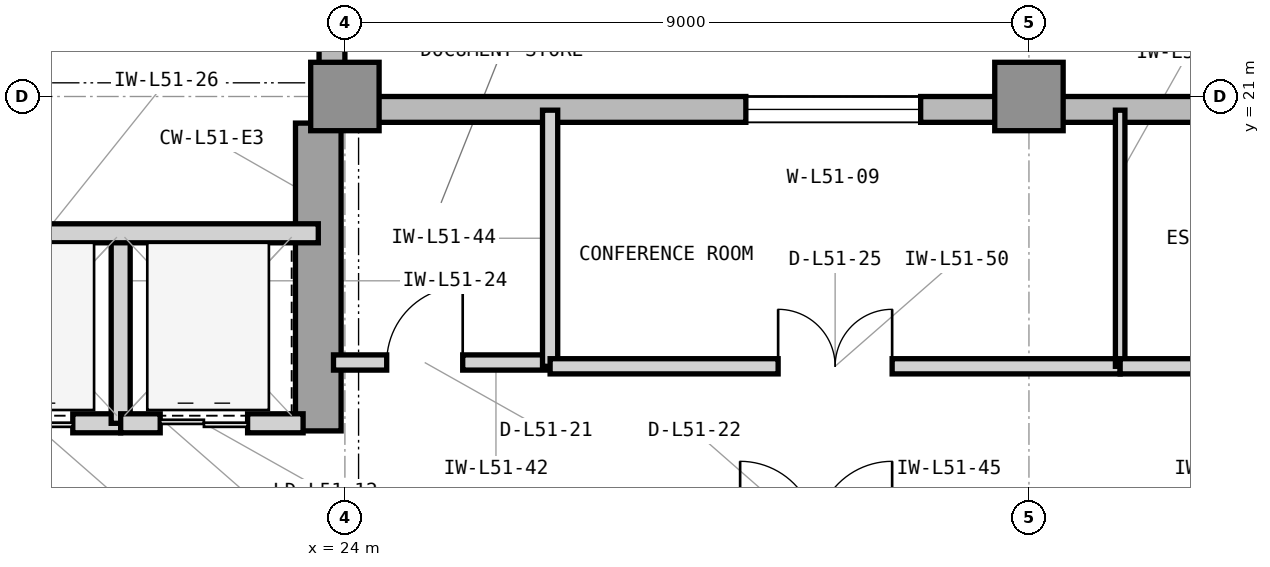
"""IFC4 building model, lengths in metres.
Left out: names, types, materials, properties, quantities, classifications, styles, units other than length and angle.
Written with IfcOpenShell. Run it as: python <this file> out.ifc"""

import sys

from ifc_helpers import new_model, si_unit, direction, frame, frame_2d, origin, origin_2d, place, context, subcontext, project, spatial, rectangle, extrude, element, fill, save


model = new_model("IFC4")
c1 = context("Model", 3, precision=1e-05, world=origin(), true_north=direction((0.0, 1.0)))
c2 = subcontext(c1, "Body", "Model", "MODEL_VIEW")
j1 = project(units=[si_unit("LENGTHUNIT", "METRE"), si_unit("PLANEANGLEUNIT", "RADIAN")], contexts=[c1])
p1 = place(None, origin())
s1 = spatial("IfcSite", under=j1, at=p1, CompositionType="ELEMENT")
p2 = place(p1, origin())
s2 = spatial("IfcBuilding", under=s1, at=p2, CompositionType="ELEMENT")
p3 = place(p2, frame((0.0, 0.0, 211.2)))
s3 = spatial("IfcBuildingStorey", under=s2, at=p3, CompositionType="ELEMENT", Elevation=211.2)
p4 = place(p3, frame((23.65, 16.6, 0.0), z_axis=(0.0, 0.0, 1.0), x_axis=(0.0, 1.0, 0.0)))
e1 = element("IfcWall", 1, at=p4, inside=s3, PredefinedType="SHEAR", context=c2, shape_type="SweptSolid", body=[
    extrude(rectangle(XDim=4.05, YDim=0.6, at=frame_2d((2.025, 0.0))), origin(), (0.0, 0.0, 1.0), 3.9),
])
for number, where, z_axis, x_axis in (
    (2, (24.0, 21.0, 0.0), (0.0, 0.0, 1.0), (1.0, 0.0, 0.0)),
    (3, (33.0, 21.0, 0.0), (0.0, 0.0, 1.0), (1.0, 0.0, 0.0)),
):
    element("IfcColumn", number, at=place(p3, frame(where, z_axis=z_axis, x_axis=x_axis)), inside=s3, PredefinedType="COLUMN", context=c2, shape_type="SweptSolid", body=[
        extrude(rectangle(XDim=0.9, YDim=0.9, at=origin_2d()), origin(), (0.0, 0.0, 1.0), 3.9),
    ])
p5 = place(p3, frame((55.4, 20.83, 0.0), z_axis=(0.0, 0.0, 1.0), x_axis=(-1.0, 0.0, 0.0)))
e4 = element("IfcWall", 4, at=p5, inside=s3, PredefinedType="STANDARD", context=c2, shape_type="SweptSolid", body=[
    extrude(rectangle(XDim=31.4, YDim=0.34, at=frame_2d((15.7, 0.0))), origin(), (0.0, 0.0, 1.0), 3.7),
])
p6 = place(p5, frame((17.167, 0.0, 0.9)))
e5 = element("IfcOpeningElement", 5, at=p6, cuts=e4, PredefinedType="OPENING", context=c2, shape_type="SweptSolid", body=[
    extrude(rectangle(XDim=2.3, YDim=2.2, at=frame_2d((1.15, 1.1))), frame((0.0, 0.18, 0.0), z_axis=(0.0, -1.0, 0.0), x_axis=(1.0, 0.0, 0.0)), (0.0, 0.0, 1.0), 0.36),
])
p7 = place(p5, frame((23.825, 0.0, 0.9)))
e6 = element("IfcOpeningElement", 6, at=p7, cuts=e4, PredefinedType="OPENING", context=c2, shape_type="SweptSolid", body=[
    extrude(rectangle(XDim=2.3, YDim=2.2, at=frame_2d((1.15, 1.1))), frame((0.0, 0.18, 0.0), z_axis=(0.0, -1.0, 0.0), x_axis=(1.0, 0.0, 0.0)), (0.0, 0.0, 1.0), 0.36),
])
p8 = place(p5, frame((8.375, 0.0, 0.9)))
e7 = element("IfcOpeningElement", 7, at=p8, cuts=e4, PredefinedType="OPENING", context=c2, shape_type="SweptSolid", body=[
    extrude(rectangle(XDim=2.3, YDim=2.2, at=frame_2d((1.15, 1.1))), frame((0.0, 0.18, 0.0), z_axis=(0.0, -1.0, 0.0), x_axis=(1.0, 0.0, 0.0)), (0.0, 0.0, 1.0), 0.36),
])
p9 = place(p3, frame((23.83, 21.0, 0.0), z_axis=(0.0, 0.0, 1.0), x_axis=(0.0, 1.0, 0.0)))
e8 = element("IfcWall", 8, at=p9, inside=s3, PredefinedType="STANDARD", context=c2, shape_type="SweptSolid", body=[
    extrude(rectangle(XDim=19.4, YDim=0.34, at=frame_2d((9.7, 0.0))), origin(), (0.0, 0.0, 1.0), 3.7),
])
p10 = place(p3, frame((18.75, 16.7, 0.0), z_axis=(0.0, 0.0, 1.0), x_axis=(1.0, 0.0, 0.0)))
e9 = element("IfcWall", 9, at=p10, inside=s3, PredefinedType="PARTITIONING", context=c2, shape_type="SweptSolid", body=[
    extrude(rectangle(XDim=2.3, YDim=0.25, at=frame_2d((1.15, 0.0))), origin(), (0.0, 0.0, 1.0), 3.283),
])
p11 = place(p10, frame((0.52, 0.0, 0.0)))
e10 = element("IfcOpeningElement", 10, at=p11, cuts=e9, PredefinedType="OPENING", context=c2, shape_type="SweptSolid", body=[
    extrude(rectangle(XDim=1.15, YDim=2.25, at=frame_2d((0.575, 1.125))), frame((0.0, 0.135, 0.0), z_axis=(0.0, -1.0, 0.0), x_axis=(1.0, 0.0, 0.0)), (0.0, 0.0, 1.0), 0.27),
])
p12 = place(p3, frame((21.05, 16.7, 0.0), z_axis=(0.0, 0.0, 1.0), x_axis=(0.0, 1.0, 0.0)))
e11 = element("IfcWall", 11, at=p12, inside=s3, PredefinedType="PARTITIONING", context=c2, shape_type="SweptSolid", body=[
    extrude(rectangle(XDim=2.5, YDim=0.25, at=frame_2d((1.25, 0.0))), origin(), (0.0, 0.0, 1.0), 3.69),
])
p13 = place(p3, frame((21.05, 16.7, 0.0), z_axis=(0.0, 0.0, 1.0), x_axis=(1.0, 0.0, 0.0)))
e12 = element("IfcWall", 12, at=p13, inside=s3, PredefinedType="PARTITIONING", context=c2, shape_type="SweptSolid", body=[
    extrude(rectangle(XDim=2.4, YDim=0.25, at=frame_2d((1.2, 0.0))), origin(), (0.0, 0.0, 1.0), 3.283),
])
p14 = place(p13, frame((0.52, 0.0, 0.0)))
e13 = element("IfcOpeningElement", 13, at=p14, cuts=e12, PredefinedType="OPENING", context=c2, shape_type="SweptSolid", body=[
    extrude(rectangle(XDim=1.15, YDim=2.25, at=frame_2d((0.575, 1.125))), frame((0.0, 0.135, 0.0), z_axis=(0.0, -1.0, 0.0), x_axis=(1.0, 0.0, 0.0)), (0.0, 0.0, 1.0), 0.27),
])
p15 = place(p3, frame((16.45, 19.2, 0.0), z_axis=(0.0, 0.0, 1.0), x_axis=(1.0, 0.0, 0.0)))
e14 = element("IfcWall", 14, at=p15, inside=s3, PredefinedType="PARTITIONING", context=c2, shape_type="SweptSolid", body=[
    extrude(rectangle(XDim=7.2, YDim=0.25, at=frame_2d((3.6, 0.0))), origin(), (0.0, 0.0, 1.0), 3.69),
])
p16 = place(p3, frame((23.85, 17.5, 0.0), z_axis=(0.0, 0.0, 1.0), x_axis=(1.0, 0.0, 0.0)))
e15 = element("IfcWall", 15, at=p16, inside=s3, PredefinedType="PARTITIONING", context=c2, shape_type="SweptSolid", body=[
    extrude(rectangle(XDim=2.85, YDim=0.2, at=frame_2d((1.425, 0.0))), origin(), (0.0, 0.0, 1.0), 3.69),
])
p17 = place(p16, frame((0.7, 0.0, 0.0)))
e16 = element("IfcOpeningElement", 16, at=p17, cuts=e15, PredefinedType="OPENING", context=c2, shape_type="SweptSolid", body=[
    extrude(rectangle(XDim=1.0, YDim=2.15, at=frame_2d((0.5, 1.075))), frame((0.0, 0.11, 0.0), z_axis=(0.0, -1.0, 0.0), x_axis=(1.0, 0.0, 0.0)), (0.0, 0.0, 1.0), 0.22),
])
p18 = place(p3, frame((26.7, 17.45, 0.0), z_axis=(0.0, 0.0, 1.0), x_axis=(0.0, 1.0, 0.0)))
e17 = element("IfcWall", 17, at=p18, inside=s3, PredefinedType="PARTITIONING", context=c2, shape_type="SweptSolid", body=[
    extrude(rectangle(XDim=3.37, YDim=0.2, at=frame_2d((1.685, 0.0))), origin(), (0.0, 0.0, 1.0), 3.69),
])
p19 = place(p3, frame((26.7, 17.45, 0.0), z_axis=(0.0, 0.0, 1.0), x_axis=(1.0, 0.0, 0.0)))
e18 = element("IfcWall", 18, at=p19, inside=s3, PredefinedType="PARTITIONING", context=c2, shape_type="SweptSolid", body=[
    extrude(rectangle(XDim=7.5, YDim=0.2, at=frame_2d((3.75, 0.0))), origin(), (0.0, 0.0, 1.0), 3.69),
])
p20 = place(p19, frame((3.0, 0.0, 0.0)))
e19 = element("IfcOpeningElement", 19, at=p20, cuts=e18, PredefinedType="OPENING", context=c2, shape_type="SweptSolid", body=[
    extrude(rectangle(XDim=1.5, YDim=2.3, at=frame_2d((0.75, 1.15))), frame((0.0, 0.11, 0.0), z_axis=(0.0, -1.0, 0.0), x_axis=(1.0, 0.0, 0.0)), (0.0, 0.0, 1.0), 0.22),
])
p21 = place(p3, frame((34.2, 17.45, 0.0), z_axis=(0.0, 0.0, 1.0), x_axis=(0.0, 1.0, 0.0)))
e20 = element("IfcWall", 20, at=p21, inside=s3, PredefinedType="PARTITIONING", context=c2, shape_type="SweptSolid", body=[
    extrude(rectangle(XDim=3.37, YDim=0.125, at=frame_2d((1.685, 0.0))), origin(), (0.0, 0.0, 1.0), 3.69),
])
p22 = place(p3, frame((34.2, 17.45, 0.0), z_axis=(0.0, 0.0, 1.0), x_axis=(1.0, 0.0, 0.0)))
e21 = element("IfcWall", 21, at=p22, inside=s3, PredefinedType="PARTITIONING", context=c2, shape_type="SweptSolid", body=[
    extrude(rectangle(XDim=7.5, YDim=0.2, at=frame_2d((3.75, 0.0))), origin(), (0.0, 0.0, 1.0), 3.69),
])
p23 = place(p22, frame((3.25, 0.0, 0.0)))
e22 = element("IfcOpeningElement", 22, at=p23, cuts=e21, PredefinedType="OPENING", context=c2, shape_type="SweptSolid", body=[
    extrude(rectangle(XDim=1.0, YDim=2.15, at=frame_2d((0.5, 1.075))), frame((0.0, 0.11, 0.0), z_axis=(0.0, -1.0, 0.0), x_axis=(1.0, 0.0, 0.0)), (0.0, 0.0, 1.0), 0.22),
])
p24 = place(p11, origin())
e23 = element("IfcDoor", 23, at=p24, inside=s3, OperationType="DOUBLE_DOOR_SLIDING", PredefinedType="DOOR", context=c2, shape_type="SweptSolid", body=[
    extrude(rectangle(XDim=1.15, YDim=2.25, at=frame_2d((0.575, 1.125))), frame((0.0, 0.025, 0.0), z_axis=(0.0, -1.0, 0.0), x_axis=(1.0, 0.0, 0.0)), (0.0, 0.0, 1.0), 0.05),
])
fill(e10, e23)
p25 = place(p14, origin())
e24 = element("IfcDoor", 24, at=p25, inside=s3, OperationType="DOUBLE_DOOR_SLIDING", PredefinedType="DOOR", context=c2, shape_type="SweptSolid", body=[
    extrude(rectangle(XDim=1.15, YDim=2.25, at=frame_2d((0.575, 1.125))), frame((0.0, 0.025, 0.0), z_axis=(0.0, -1.0, 0.0), x_axis=(1.0, 0.0, 0.0)), (0.0, 0.0, 1.0), 0.05),
])
fill(e13, e24)
p26 = place(p17, origin())
e25 = element("IfcDoor", 25, at=p26, inside=s3, OperationType="SINGLE_SWING_RIGHT", PredefinedType="DOOR", context=c2, shape_type="SweptSolid", body=[
    extrude(rectangle(XDim=1.0, YDim=2.15, at=frame_2d((0.5, 1.075))), frame((0.0, 0.025, 0.0), z_axis=(0.0, -1.0, 0.0), x_axis=(1.0, 0.0, 0.0)), (0.0, 0.0, 1.0), 0.05),
])
fill(e16, e25)
p27 = place(p20, origin())
e26 = element("IfcDoor", 26, at=p27, inside=s3, OperationType="DOUBLE_DOOR_SINGLE_SWING", PredefinedType="DOOR", context=c2, shape_type="SweptSolid", body=[
    extrude(rectangle(XDim=1.5, YDim=2.3, at=frame_2d((0.75, 1.15))), frame((0.0, 0.025, 0.0), z_axis=(0.0, -1.0, 0.0), x_axis=(1.0, 0.0, 0.0)), (0.0, 0.0, 1.0), 0.05),
])
fill(e19, e26)
p28 = place(p7, origin())
e27 = element("IfcWindow", 27, at=p28, inside=s3, PartitioningType="SINGLE_PANEL", PredefinedType="WINDOW", context=c2, shape_type="SweptSolid", body=[
    extrude(rectangle(XDim=2.3, YDim=2.2, at=frame_2d((1.15, 1.1))), frame((0.0, 0.11, 0.0), z_axis=(0.0, -1.0, 0.0), x_axis=(1.0, 0.0, 0.0)), (0.0, 0.0, 1.0), 0.06),
])
fill(e6, e27)
save(model, sys.argv[1])
